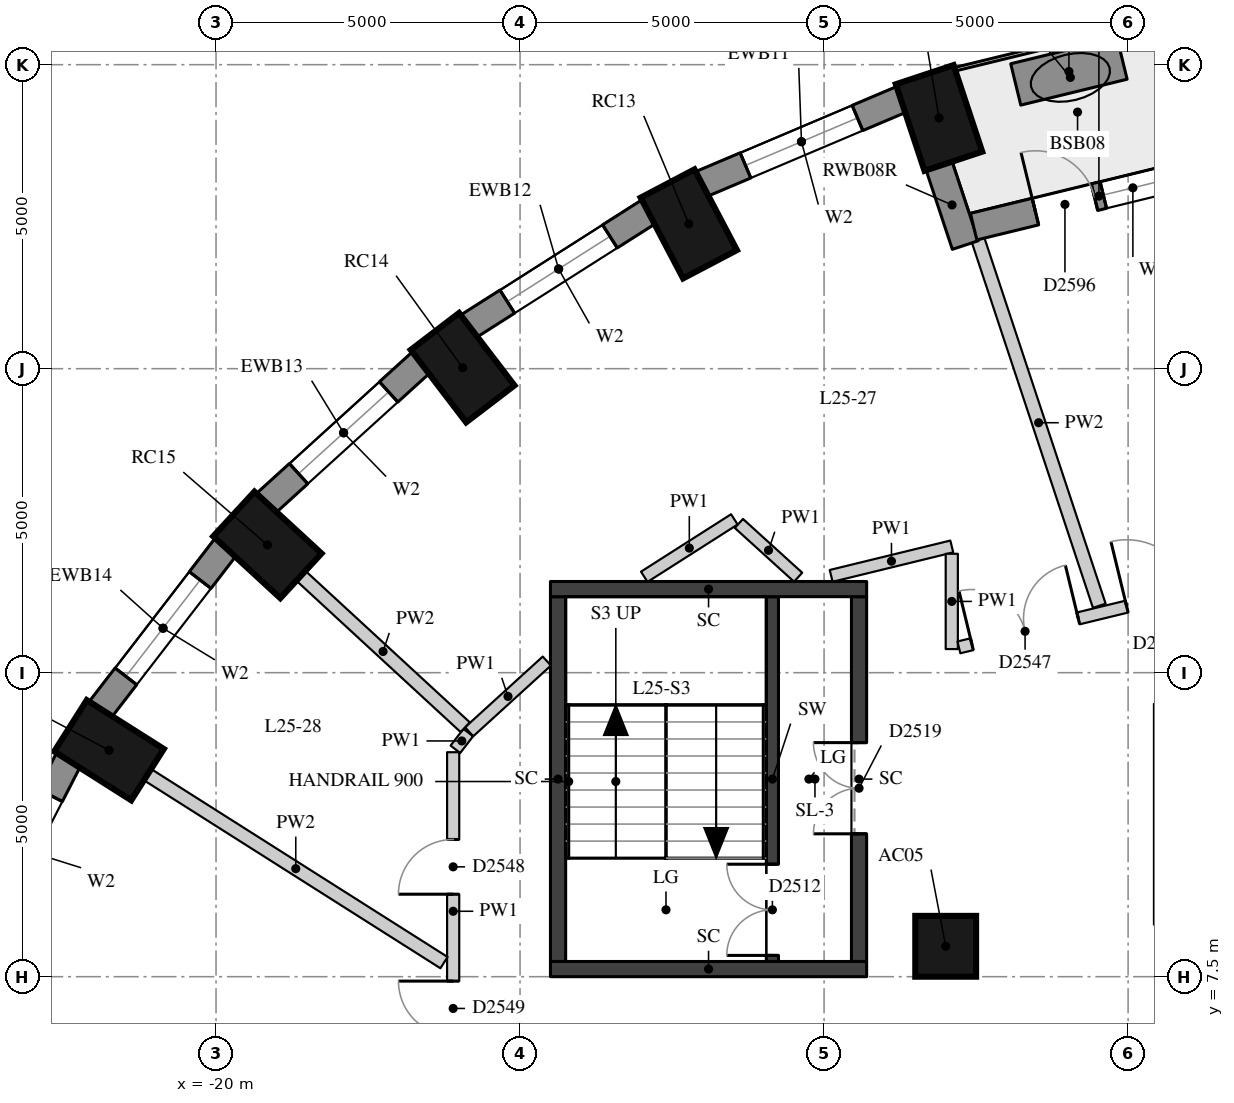
"""IFC4 building model, lengths in metres.
Left out: names, types, materials, properties, quantities, classifications, styles, units other than length and angle.
Written with IfcOpenShell. Run it as: python <this file> out.ifc"""

import sys

from ifc_helpers import new_model, si_unit, direction, frame, frame_2d, origin, origin_2d, place, context, subcontext, project, spatial, rectangle, extrude, element, fill, save


model = new_model("IFC4")
c1 = context("Model", 3, precision=1e-05, world=origin(), true_north=direction((0.0, 1.0)))
c2 = subcontext(c1, "Body", "Model", "MODEL_VIEW")
j1 = project(units=[si_unit("LENGTHUNIT", "METRE"), si_unit("PLANEANGLEUNIT", "RADIAN")], contexts=[c1])
p1 = place(None, origin())
s1 = spatial("IfcSite", under=j1, at=p1, CompositionType="ELEMENT")
p2 = place(p1, origin())
s2 = spatial("IfcBuilding", under=s1, at=p2, CompositionType="ELEMENT")
p3 = place(p2, frame((0.0, 0.0, 92.2)))
s3 = spatial("IfcBuildingStorey", under=s2, at=p3, CompositionType="ELEMENT", Elevation=92.2)
for number, where, z_axis, x_axis in (
    (1, (-8.11, 21.624, 0.0), (0.0, 0.0, 1.0), (-0.315, 0.949, 0.0)),
    (2, (-12.225, 19.882, 0.0), (0.0, 0.0, 1.0), (-0.465, 0.885, 0.0)),
    (3, (-15.945, 17.517, 0.0), (0.0, 0.0, 1.0), (-0.607, 0.795, 0.0)),
    (4, (-19.156, 14.602, 0.0), (0.0, 0.0, 1.0), (-0.735, 0.678, 0.0)),
    (5, (-21.76, 11.225, 0.0), (0.0, 0.0, 1.0), (-0.845, 0.536, 0.0)),
):
    element("IfcColumn", number, at=place(p3, frame(where, z_axis=z_axis, x_axis=x_axis)), inside=s3, PredefinedType="COLUMN", context=c2, shape_type="SweptSolid", body=[
        extrude(rectangle(XDim=1.5, YDim=1.0, at=origin_2d()), origin(), (0.0, 0.0, 1.0), 3.3),
    ])
p4 = place(p3, frame((-8.0, 8.0, 0.0), z_axis=(0.0, 0.0, 1.0), x_axis=(1.0, 0.0, 0.0)))
e6 = element("IfcColumn", 6, at=p4, inside=s3, PredefinedType="COLUMN", context=c2, shape_type="SweptSolid", body=[
    extrude(rectangle(XDim=1.0, YDim=1.0, at=origin_2d()), origin(), (0.0, 0.0, 1.0), 3.3),
])
p5 = place(p3, frame((-8.718, 21.934, 0.0), z_axis=(0.0, 0.0, 1.0), x_axis=(-0.920879975612, -0.389846213932, 0.0)))
e7 = element("IfcWall", 7, at=p5, inside=s3, PredefinedType="SOLIDWALL", context=c2, shape_type="SweptSolid", body=[
    extrude(rectangle(XDim=3.592, YDim=0.45, at=frame_2d((1.796, 0.0))), origin(), (0.0, 0.0, 1.0), 3.02),
])
p6 = place(p5, frame((0.796, 0.0, 0.4)))
e8 = element("IfcOpeningElement", 8, at=p6, cuts=e7, PredefinedType="OPENING", context=c2, shape_type="SweptSolid", body=[
    extrude(rectangle(XDim=2.0, YDim=1.75, at=frame_2d((1.0, 0.875))), frame((0.0, 0.235, 0.0), z_axis=(0.0, -1.0, 0.0), x_axis=(1.0, 0.0, 0.0)), (0.0, 0.0, 1.0), 0.47),
])
p7 = place(p3, frame((-12.875, 20.087, 0.0), z_axis=(0.0, 0.0, 1.0), x_axis=(-0.843860651879, -0.536562391722, 0.0)))
e9 = element("IfcWall", 9, at=p7, inside=s3, PredefinedType="SOLIDWALL", context=c2, shape_type="SweptSolid", body=[
    extrude(rectangle(XDim=3.532, YDim=0.45, at=frame_2d((1.766, 0.0))), origin(), (0.0, 0.0, 1.0), 3.02),
])
p8 = place(p7, frame((0.766, 0.0, 0.4)))
e10 = element("IfcOpeningElement", 10, at=p8, cuts=e9, PredefinedType="OPENING", context=c2, shape_type="SweptSolid", body=[
    extrude(rectangle(XDim=2.0, YDim=1.75, at=frame_2d((1.0, 0.875))), frame((0.0, 0.235, 0.0), z_axis=(0.0, -1.0, 0.0), x_axis=(1.0, 0.0, 0.0)), (0.0, 0.0, 1.0), 0.47),
])
p9 = place(p3, frame((-16.62, 17.61, 0.0), z_axis=(0.0, 0.0, 1.0), x_axis=(-0.74032902847, -0.672244694739, 0.0)))
e11 = element("IfcWall", 11, at=p9, inside=s3, PredefinedType="SOLIDWALL", context=c2, shape_type="SweptSolid", body=[
    extrude(rectangle(XDim=3.464, YDim=0.45, at=frame_2d((1.732, 0.0))), origin(), (0.0, 0.0, 1.0), 3.02),
])
p10 = place(p9, frame((0.732, 0.0, 0.4)))
e12 = element("IfcOpeningElement", 12, at=p10, cuts=e11, PredefinedType="OPENING", context=c2, shape_type="SweptSolid", body=[
    extrude(rectangle(XDim=2.0, YDim=1.75, at=frame_2d((1.0, 0.875))), frame((0.0, 0.235, 0.0), z_axis=(0.0, -1.0, 0.0), x_axis=(1.0, 0.0, 0.0)), (0.0, 0.0, 1.0), 0.47),
])
p11 = place(p3, frame((-19.835, 14.575, 0.0), z_axis=(0.0, 0.0, 1.0), x_axis=(-0.610693945156, -0.791866721961, 0.0)))
e13 = element("IfcWall", 13, at=p11, inside=s3, PredefinedType="SOLIDWALL", context=c2, shape_type="SweptSolid", body=[
    extrude(rectangle(XDim=3.395, YDim=0.45, at=frame_2d((1.697, 0.0))), origin(), (0.0, 0.0, 1.0), 3.02),
])
p12 = place(p11, frame((0.697, 0.0, 0.4)))
e14 = element("IfcOpeningElement", 14, at=p12, cuts=e13, PredefinedType="OPENING", context=c2, shape_type="SweptSolid", body=[
    extrude(rectangle(XDim=2.0, YDim=1.75, at=frame_2d((1.0, 0.875))), frame((0.0, 0.235, 0.0), z_axis=(0.0, -1.0, 0.0), x_axis=(1.0, 0.0, 0.0)), (0.0, 0.0, 1.0), 0.47),
])
p13 = place(p3, frame((-22.423, 11.077, 0.0), z_axis=(0.0, 0.0, 1.0), x_axis=(-0.456828186229, -0.889554949549, 0.0)))
e15 = element("IfcWall", 15, at=p13, inside=s3, PredefinedType="SOLIDWALL", context=c2, shape_type="SweptSolid", body=[
    extrude(rectangle(XDim=3.333, YDim=0.45, at=frame_2d((1.667, 0.0))), origin(), (0.0, 0.0, 1.0), 3.02),
])
p14 = place(p13, frame((0.666, 0.0, 0.4)))
e16 = element("IfcOpeningElement", 16, at=p14, cuts=e15, PredefinedType="OPENING", context=c2, shape_type="SweptSolid", body=[
    extrude(rectangle(XDim=2.0, YDim=1.75, at=frame_2d((1.0, 0.875))), frame((0.0, 0.235, 0.0), z_axis=(0.0, -1.0, 0.0), x_axis=(1.0, 0.0, 0.0)), (0.0, 0.0, 1.0), 0.47),
])
p15 = place(p3, frame((-8.114, 20.853, 0.0), z_axis=(0.0, 0.0, 1.0), x_axis=(0.314488854508, -0.949261165534, 0.0)))
e17 = element("IfcWall", 17, at=p15, inside=s3, PredefinedType="SOLIDWALL", context=c2, shape_type="SweptSolid", body=[
    extrude(rectangle(XDim=1.39, YDim=0.45, at=frame_2d((0.695, 0.0))), origin(), (0.0, 0.0, 1.0), 3.02),
])
p16 = place(p3, frame((-3.42, 20.841, 0.0), z_axis=(0.0, 0.0, 1.0), x_axis=(-0.971511611373, -0.23699195971, 0.0)))
e18 = element("IfcWall", 18, at=p16, inside=s3, PredefinedType="SOLIDWALL", context=c2, shape_type="SweptSolid", body=[
    extrude(rectangle(XDim=4.241, YDim=0.45, at=frame_2d((2.121, 0.0))), origin(), (0.0, 0.0, 1.0), 3.02),
])
p17 = place(p16, frame((1.045, 0.0, 0.4)))
e19 = element("IfcOpeningElement", 19, at=p17, cuts=e18, PredefinedType="OPENING", context=c2, shape_type="SweptSolid", body=[
    extrude(rectangle(XDim=1.0, YDim=1.75, at=frame_2d((0.5, 0.875))), frame((0.0, 0.235, 0.0), z_axis=(0.0, -1.0, 0.0), x_axis=(1.0, 0.0, 0.0)), (0.0, 0.0, 1.0), 0.47),
])
p18 = place(p16, frame((2.196, 0.0, 0.0)))
e20 = element("IfcOpeningElement", 20, at=p18, cuts=e18, PredefinedType="OPENING", context=c2, shape_type="SweptSolid", body=[
    extrude(rectangle(XDim=1.0, YDim=2.15, at=frame_2d((0.5, 1.075))), frame((0.0, 0.235, 0.0), z_axis=(0.0, -1.0, 0.0), x_axis=(1.0, 0.0, 0.0)), (0.0, 0.0, 1.0), 0.47),
])
p19 = place(p3, frame((-5.099, 22.601, 0.0), z_axis=(0.0, 0.0, 1.0), x_axis=(-0.971654974133, -0.23640349245, 0.0)))
e21 = element("IfcWall", 21, at=p19, inside=s3, PredefinedType="USERDEFINED", context=c2, shape_type="SweptSolid", body=[
    extrude(rectangle(XDim=1.8, YDim=0.7, at=frame_2d((0.9, 0.0))), origin(), (0.0, 0.0, 1.0), 0.75),
])
p20 = place(p3, frame((-10.85, 7.75, 0.0), z_axis=(0.0, 0.0, 1.0), x_axis=(0.0, 1.0, 0.0)))
e22 = element("IfcWall", 22, at=p20, inside=s3, PredefinedType="SHEAR", context=c2, shape_type="SweptSolid", body=[
    extrude(rectangle(XDim=6.0, YDim=0.2, at=frame_2d((3.0, 0.0))), origin(), (0.0, 0.0, 1.0), 3.02),
])
p21 = place(p20, frame((0.1, 0.0, 0.0)))
e23 = element("IfcOpeningElement", 23, at=p21, cuts=e22, PredefinedType="OPENING", context=c2, shape_type="SweptSolid", body=[
    extrude(rectangle(XDim=1.5, YDim=2.1, at=frame_2d((0.75, 1.05))), frame((0.0, 0.11, 0.0), z_axis=(0.0, -1.0, 0.0), x_axis=(1.0, 0.0, 0.0)), (0.0, 0.0, 1.0), 0.22),
])
p22 = place(p3, frame((-14.375, 7.75, -0.28), z_axis=(0.0, 0.0, 1.0), x_axis=(0.0, 1.0, 0.0)))
e24 = element("IfcWall", 24, at=p22, inside=s3, PredefinedType="SHEAR", context=c2, shape_type="SweptSolid", body=[
    extrude(rectangle(XDim=6.0, YDim=0.25, at=frame_2d((3.0, 0.0))), origin(), (0.0, 0.0, 1.0), 3.3),
])
p23 = place(p3, frame((-9.425, 7.75, -0.28), z_axis=(0.0, 0.0, 1.0), x_axis=(0.0, 1.0, 0.0)))
e25 = element("IfcWall", 25, at=p23, inside=s3, PredefinedType="SHEAR", context=c2, shape_type="SweptSolid", body=[
    extrude(rectangle(XDim=6.0, YDim=0.25, at=frame_2d((3.0, 0.0))), origin(), (0.0, 0.0, 1.0), 3.3),
])
p24 = place(p23, frame((2.1, 0.0, 0.28)))
e26 = element("IfcOpeningElement", 26, at=p24, cuts=e25, PredefinedType="OPENING", context=c2, shape_type="SweptSolid", body=[
    extrude(rectangle(XDim=1.5, YDim=2.1, at=frame_2d((0.75, 1.05))), frame((0.0, 0.135, 0.0), z_axis=(0.0, -1.0, 0.0), x_axis=(1.0, 0.0, 0.0)), (0.0, 0.0, 1.0), 0.27),
])
for number, where, z_axis, x_axis in (
    (27, (-14.5, 13.875, -0.28), (0.0, 0.0, 1.0), (1.0, 0.0, 0.0)),
    (28, (-14.5, 7.625, -0.28), (0.0, 0.0, 1.0), (1.0, 0.0, 0.0)),
):
    element("IfcWall", number, at=place(p3, frame(where, z_axis=z_axis, x_axis=x_axis)), inside=s3, PredefinedType="SHEAR", context=c2, shape_type="SweptSolid", body=[
        extrude(rectangle(XDim=5.2, YDim=0.25, at=frame_2d((2.6, 0.0))), origin(), (0.0, 0.0, 1.0), 3.3),
    ])
p25 = place(p3, frame((-16.1, 5.96, 0.0), z_axis=(0.0, 0.0, 1.0), x_axis=(0.0, 1.0, 0.0)))
e29 = element("IfcWall", 29, at=p25, inside=s3, PredefinedType="PARTITIONING", context=c2, shape_type="SweptSolid", body=[
    extrude(rectangle(XDim=5.232, YDim=0.2, at=frame_2d((2.616, 0.0))), origin(), (0.0, 0.0, 1.0), 3.02),
])
p26 = place(p25, frame((2.897, 0.0, 0.0)))
e30 = element("IfcOpeningElement", 30, at=p26, cuts=e29, PredefinedType="OPENING", context=c2, shape_type="SweptSolid", body=[
    extrude(rectangle(XDim=0.9, YDim=2.1, at=frame_2d((0.45, 1.05))), frame((0.0, 0.11, 0.0), z_axis=(0.0, -1.0, 0.0), x_axis=(1.0, 0.0, 0.0)), (0.0, 0.0, 1.0), 0.22),
])
p27 = place(p25, frame((0.568, 0.0, 0.0)))
e31 = element("IfcOpeningElement", 31, at=p27, cuts=e29, PredefinedType="OPENING", context=c2, shape_type="SweptSolid", body=[
    extrude(rectangle(XDim=0.9, YDim=2.1, at=frame_2d((0.45, 1.05))), frame((0.0, 0.11, 0.0), z_axis=(0.0, -1.0, 0.0), x_axis=(1.0, 0.0, 0.0)), (0.0, 0.0, 1.0), 0.22),
])
p28 = place(p3, frame((-16.063, 11.24, 0.0), z_axis=(0.0, 0.0, 1.0), x_axis=(0.609744747854, 0.792597844096, 0.0)))
e32 = element("IfcWall", 32, at=p28, inside=s3, PredefinedType="PARTITIONING", context=c2, shape_type="SweptSolid", body=[
    extrude(rectangle(XDim=0.347, YDim=0.2, at=frame_2d((0.174, 0.0))), origin(), (0.0, 0.0, 1.0), 3.02),
])
p29 = place(p3, frame((-15.837, 11.528, 0.0), z_axis=(0.0, 0.0, 1.0), x_axis=(0.739402681643, 0.673263450946, 0.0)))
e33 = element("IfcWall", 33, at=p29, inside=s3, PredefinedType="PARTITIONING", context=c2, shape_type="SweptSolid", body=[
    extrude(rectangle(XDim=1.728, YDim=0.2, at=frame_2d((0.864, 0.0))), origin(), (0.0, 0.0, 1.0), 3.02),
])
p30 = place(p3, frame((-12.957, 14.077, 0.0), z_axis=(0.0, 0.0, 1.0), x_axis=(0.843226410818, 0.537558573645, 0.0)))
e34 = element("IfcWall", 34, at=p30, inside=s3, PredefinedType="PARTITIONING", context=c2, shape_type="SweptSolid", body=[
    extrude(rectangle(XDim=1.757, YDim=0.2, at=frame_2d((0.878, 0.0))), origin(), (0.0, 0.0, 1.0), 3.02),
])
p31 = place(p3, frame((-11.401, 14.955, 0.0), z_axis=(0.0, 0.0, 1.0), x_axis=(0.740594498135, -0.671952222507, 0.0)))
e35 = element("IfcWall", 35, at=p31, inside=s3, PredefinedType="PARTITIONING", context=c2, shape_type="SweptSolid", body=[
    extrude(rectangle(XDim=1.316, YDim=0.2, at=frame_2d((0.658, 0.0))), origin(), (0.0, 0.0, 1.0), 3.02),
])
p32 = place(p3, frame((-9.884, 14.092, 0.0), z_axis=(0.0, 0.0, 1.0), x_axis=(0.971512281799, 0.236989211388, 0.0)))
e36 = element("IfcWall", 36, at=p32, inside=s3, PredefinedType="PARTITIONING", context=c2, shape_type="SweptSolid", body=[
    extrude(rectangle(XDim=2.042, YDim=0.2, at=frame_2d((1.021, 0.0))), origin(), (0.0, 0.0, 1.0), 3.02),
])
p33 = place(p3, frame((-7.9, 14.456, 0.0), z_axis=(0.0, 0.0, 1.0), x_axis=(0.0, -1.0, 0.0)))
e37 = element("IfcWall", 37, at=p33, inside=s3, PredefinedType="PARTITIONING", context=c2, shape_type="SweptSolid", body=[
    extrude(rectangle(XDim=1.567, YDim=0.2, at=frame_2d((0.784, 0.0))), origin(), (0.0, 0.0, 1.0), 3.02),
])
p34 = place(p3, frame((-7.783, 12.916, 0.0), z_axis=(0.0, 0.0, 1.0), x_axis=(0.971770455305, 0.235928341232, 0.0)))
e38 = element("IfcWall", 38, at=p34, inside=s3, PredefinedType="PARTITIONING", context=c2, shape_type="SweptSolid", body=[
    extrude(rectangle(XDim=8.832, YDim=0.2, at=frame_2d((4.416, 0.0))), origin(), (0.0, 0.0, 1.0), 2.42),
])
p35 = place(p34, frame((2.84, 0.0, 0.0)))
e39 = element("IfcOpeningElement", 39, at=p35, cuts=e38, PredefinedType="OPENING", context=c2, shape_type="SweptSolid", body=[
    extrude(rectangle(XDim=1.1, YDim=2.1, at=frame_2d((0.55, 1.05))), frame((0.0, 0.11, 0.0), z_axis=(0.0, -1.0, 0.0), x_axis=(1.0, 0.0, 0.0)), (0.0, 0.0, 1.0), 0.22),
])
p36 = place(p34, frame((0.22, 0.0, 0.0)))
e40 = element("IfcOpeningElement", 40, at=p36, cuts=e38, PredefinedType="OPENING", context=c2, shape_type="SweptSolid", body=[
    extrude(rectangle(XDim=1.8, YDim=2.1, at=frame_2d((0.9, 1.05))), frame((0.0, 0.11, 0.0), z_axis=(0.0, -1.0, 0.0), x_axis=(1.0, 0.0, 0.0)), (0.0, 0.0, 1.0), 0.22),
])
p37 = place(p3, frame((-4.5, 8.356, 0.0), z_axis=(0.0, 0.0, 1.0), x_axis=(0.0, 1.0, 0.0)))
e41 = element("IfcWall", 41, at=p37, inside=s3, PredefinedType="PARTITIONING", context=c2, shape_type="SweptSolid", body=[
    extrude(rectangle(XDim=3.631, YDim=0.15, at=frame_2d((1.815, 0.0))), origin(), (0.0, 0.0, 1.0), 3.02),
])
p38 = place(p3, frame((-7.469, 19.622, 0.0), z_axis=(0.0, 0.0, 1.0), x_axis=(0.314576080141, -0.94923226336, 0.0)))
e42 = element("IfcWall", 42, at=p38, inside=s3, PredefinedType="PARTITIONING", context=c2, shape_type="SweptSolid", body=[
    extrude(rectangle(XDim=6.343, YDim=0.22, at=frame_2d((3.171, 0.0))), origin(), (0.0, 0.0, 1.0), 3.02),
])
p39 = place(p3, frame((-18.604, 14.094, 0.0), z_axis=(0.0, 0.0, 1.0), x_axis=(0.73529495628, -0.677747244383, 0.0)))
e43 = element("IfcWall", 43, at=p39, inside=s3, PredefinedType="PARTITIONING", context=c2, shape_type="SweptSolid", body=[
    extrude(rectangle(XDim=3.674, YDim=0.22, at=frame_2d((1.837, 0.0))), origin(), (0.0, 0.0, 1.0), 3.02),
])
p40 = place(p3, frame((-21.126, 10.823, 0.0), z_axis=(0.0, 0.0, 1.0), x_axis=(0.844518840625, -0.535525842355, 0.0)))
e44 = element("IfcWall", 44, at=p40, inside=s3, PredefinedType="PARTITIONING", context=c2, shape_type="SweptSolid", body=[
    extrude(rectangle(XDim=5.773, YDim=0.22, at=frame_2d((2.887, 0.0))), origin(), (0.0, 0.0, 1.0), 3.02),
])
p41 = place(p6, origin())
e45 = element("IfcWindow", 45, at=p41, inside=s3, PartitioningType="SINGLE_PANEL", PredefinedType="WINDOW", context=c2, shape_type="SweptSolid", body=[
    extrude(rectangle(XDim=2.0, YDim=1.75, at=frame_2d((1.0, 0.875))), frame((0.0, 0.035, 0.0), z_axis=(0.0, -1.0, 0.0), x_axis=(1.0, 0.0, 0.0)), (0.0, 0.0, 1.0), 0.06),
])
fill(e8, e45)
p42 = place(p8, origin())
e46 = element("IfcWindow", 46, at=p42, inside=s3, PartitioningType="SINGLE_PANEL", PredefinedType="WINDOW", context=c2, shape_type="SweptSolid", body=[
    extrude(rectangle(XDim=2.0, YDim=1.75, at=frame_2d((1.0, 0.875))), frame((0.0, 0.035, 0.0), z_axis=(0.0, -1.0, 0.0), x_axis=(1.0, 0.0, 0.0)), (0.0, 0.0, 1.0), 0.06),
])
fill(e10, e46)
p43 = place(p10, origin())
e47 = element("IfcWindow", 47, at=p43, inside=s3, PartitioningType="SINGLE_PANEL", PredefinedType="WINDOW", context=c2, shape_type="SweptSolid", body=[
    extrude(rectangle(XDim=2.0, YDim=1.75, at=frame_2d((1.0, 0.875))), frame((0.0, 0.035, 0.0), z_axis=(0.0, -1.0, 0.0), x_axis=(1.0, 0.0, 0.0)), (0.0, 0.0, 1.0), 0.06),
])
fill(e12, e47)
p44 = place(p12, origin())
e48 = element("IfcWindow", 48, at=p44, inside=s3, PartitioningType="SINGLE_PANEL", PredefinedType="WINDOW", context=c2, shape_type="SweptSolid", body=[
    extrude(rectangle(XDim=2.0, YDim=1.75, at=frame_2d((1.0, 0.875))), frame((0.0, 0.035, 0.0), z_axis=(0.0, -1.0, 0.0), x_axis=(1.0, 0.0, 0.0)), (0.0, 0.0, 1.0), 0.06),
])
fill(e14, e48)
p45 = place(p14, origin())
e49 = element("IfcWindow", 49, at=p45, inside=s3, PartitioningType="SINGLE_PANEL", PredefinedType="WINDOW", context=c2, shape_type="SweptSolid", body=[
    extrude(rectangle(XDim=2.0, YDim=1.75, at=frame_2d((1.0, 0.875))), frame((0.0, 0.035, 0.0), z_axis=(0.0, -1.0, 0.0), x_axis=(1.0, 0.0, 0.0)), (0.0, 0.0, 1.0), 0.06),
])
fill(e16, e49)
p46 = place(p17, origin())
e50 = element("IfcWindow", 50, at=p46, inside=s3, PartitioningType="SINGLE_PANEL", PredefinedType="WINDOW", context=c2, shape_type="SweptSolid", body=[
    extrude(rectangle(XDim=1.0, YDim=1.75, at=frame_2d((0.5, 0.875))), frame((0.0, 0.035, 0.0), z_axis=(0.0, -1.0, 0.0), x_axis=(1.0, 0.0, 0.0)), (0.0, 0.0, 1.0), 0.06),
])
fill(e19, e50)
p47 = place(p18, frame((1.0, 0.0, 0.0), z_axis=(0.0, 0.0, 1.0), x_axis=(-1.0, 0.0, 0.0)))
e51 = element("IfcDoor", 51, at=p47, inside=s3, OperationType="SINGLE_SWING_LEFT", PredefinedType="DOOR", context=c2, shape_type="SweptSolid", body=[
    extrude(rectangle(XDim=1.0, YDim=2.15, at=frame_2d((0.5, 1.075))), frame((0.0, 0.075, 0.0), z_axis=(0.0, -1.0, 0.0), x_axis=(1.0, 0.0, 0.0)), (0.0, 0.0, 1.0), 0.05),
])
fill(e20, e51)
p48 = place(p21, origin())
e52 = element("IfcDoor", 52, at=p48, inside=s3, OperationType="DOUBLE_DOOR_SINGLE_SWING", PredefinedType="DOOR", context=c2, shape_type="SweptSolid", body=[
    extrude(rectangle(XDim=1.5, YDim=2.1, at=frame_2d((0.75, 1.05))), frame((0.0, 0.025, 0.0), z_axis=(0.0, -1.0, 0.0), x_axis=(1.0, 0.0, 0.0)), (0.0, 0.0, 1.0), 0.05),
])
fill(e23, e52)
p49 = place(p24, origin())
e53 = element("IfcDoor", 53, at=p49, inside=s3, OperationType="DOUBLE_DOOR_SINGLE_SWING", PredefinedType="DOOR", context=c2, shape_type="SweptSolid", body=[
    extrude(rectangle(XDim=1.5, YDim=2.1, at=frame_2d((0.75, 1.05))), frame((0.0, 0.025, 0.0), z_axis=(0.0, -1.0, 0.0), x_axis=(1.0, 0.0, 0.0)), (0.0, 0.0, 1.0), 0.05),
])
fill(e26, e53)
p50 = place(p35, origin())
e54 = element("IfcDoor", 54, at=p50, inside=s3, OperationType="SINGLE_SWING_LEFT", PredefinedType="DOOR", context=c2, shape_type="SweptSolid", body=[
    extrude(rectangle(XDim=1.1, YDim=2.1, at=frame_2d((0.55, 1.05))), frame((0.0, 0.025, 0.0), z_axis=(0.0, -1.0, 0.0), x_axis=(1.0, 0.0, 0.0)), (0.0, 0.0, 1.0), 0.05),
])
fill(e39, e54)
p51 = place(p36, origin())
e55 = element("IfcDoor", 55, at=p51, inside=s3, OperationType="DOUBLE_DOOR_SINGLE_SWING", PredefinedType="DOOR", context=c2, shape_type="SweptSolid", body=[
    extrude(rectangle(XDim=1.8, YDim=2.1, at=frame_2d((0.9, 1.05))), frame((0.0, 0.025, 0.0), z_axis=(0.0, -1.0, 0.0), x_axis=(1.0, 0.0, 0.0)), (0.0, 0.0, 1.0), 0.05),
])
fill(e40, e55)
p52 = place(p26, origin())
e56 = element("IfcDoor", 56, at=p52, inside=s3, OperationType="SINGLE_SWING_LEFT", PredefinedType="DOOR", context=c2, shape_type="SweptSolid", body=[
    extrude(rectangle(XDim=0.9, YDim=2.1, at=frame_2d((0.45, 1.05))), frame((0.0, 0.025, 0.0), z_axis=(0.0, -1.0, 0.0), x_axis=(1.0, 0.0, 0.0)), (0.0, 0.0, 1.0), 0.05),
])
fill(e30, e56)
p53 = place(p27, origin())
e57 = element("IfcDoor", 57, at=p53, inside=s3, OperationType="SINGLE_SWING_RIGHT", PredefinedType="DOOR", context=c2, shape_type="SweptSolid", body=[
    extrude(rectangle(XDim=0.9, YDim=2.1, at=frame_2d((0.45, 1.05))), frame((0.0, 0.025, 0.0), z_axis=(0.0, -1.0, 0.0), x_axis=(1.0, 0.0, 0.0)), (0.0, 0.0, 1.0), 0.05),
])
fill(e31, e57)
save(model, sys.argv[1])
